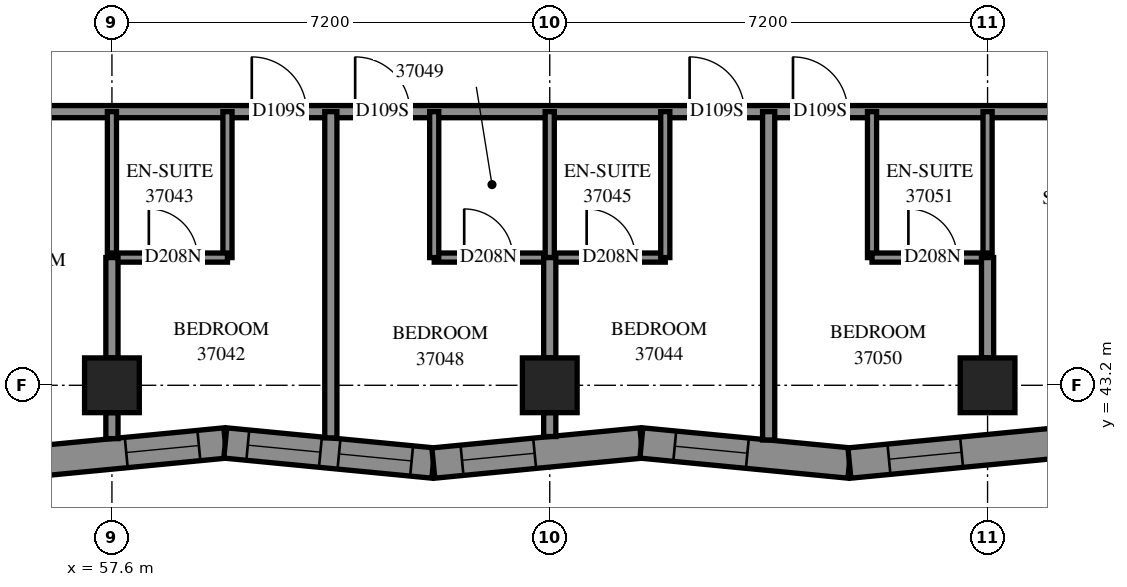
"""IFC4 building model, lengths in metres.
Left out: names, types, materials, properties, quantities, classifications, styles, units other than length and angle.
Written with IfcOpenShell. Run it as: python <this file> out.ifc"""

import sys

from ifc_helpers import new_model, si_unit, direction, frame, frame_2d, origin, origin_2d, place, context, subcontext, project, spatial, polyline, rectangle, outline, extrude, element, fill, save


model = new_model("IFC4")
c1 = context("Model", 3, precision=1e-05, world=origin(), true_north=direction((0.0, 1.0)))
c2 = subcontext(c1, "Body", "Model", "MODEL_VIEW")
j1 = project(units=[si_unit("LENGTHUNIT", "METRE"), si_unit("PLANEANGLEUNIT", "RADIAN")], contexts=[c1])
p1 = place(None, origin())
s1 = spatial("IfcSite", under=j1, at=p1, CompositionType="ELEMENT")
p2 = place(p1, origin())
s2 = spatial("IfcBuilding", under=s1, at=p2, CompositionType="ELEMENT")
p3 = place(p2, frame((0.0, 0.0, 138.8)))
s3 = spatial("IfcBuildingStorey", under=s2, at=p3, CompositionType="ELEMENT", Elevation=138.8)
for number, where, z_axis, x_axis in (
    (1, (57.6, 43.2, 0.0), (0.0, 0.0, 1.0), (1.0, 0.0, 0.0)),
    (2, (64.8, 43.2, 0.0), (0.0, 0.0, 1.0), (1.0, 0.0, 0.0)),
    (3, (72.0, 43.2, 0.0), (0.0, 0.0, 1.0), (1.0, 0.0, 0.0)),
):
    element("IfcColumn", number, at=place(p3, frame(where, z_axis=z_axis, x_axis=x_axis)), inside=s3, PredefinedType="COLUMN", context=c2, shape_type="SweptSolid", body=[
        extrude(rectangle(XDim=0.9, YDim=0.9, at=origin_2d()), origin(), (0.0, 0.0, 1.0), 3.1),
    ])
p4 = place(p3, frame((56.043, 41.921, 0.0), z_axis=(0.0, 0.0, 1.0), x_axis=(0.995380467, 0.096008989, 0.0)))
e4 = element("IfcWall", 4, at=p4, inside=s3, PredefinedType="SOLIDWALL", context=c2, shape_type="SweptSolid", body=[
    extrude(outline(polyline([(-0.024, -0.25), (3.413, -0.25), (3.461, 0.25), (0.024, 0.25), (-0.024, -0.25)])), origin(), (0.0, 0.0, 1.0), 3.1),
])
p5 = place(p4, frame((1.801, 0.0, 0.45)))
e5 = element("IfcOpeningElement", 5, at=p5, cuts=e4, PredefinedType="OPENING", context=c2, shape_type="SweptSolid", body=[
    extrude(rectangle(XDim=1.2, YDim=2.5, at=frame_2d((0.6, 1.25))), frame((0.0, 0.26, 0.0), z_axis=(0.0, -1.0, 0.0), x_axis=(1.0, 0.0, 0.0)), (0.0, 0.0, 1.0), 0.52),
])
p6 = place(p3, frame((59.464, 42.251, 0.0), z_axis=(0.0, 0.0, 1.0), x_axis=(0.995380467, -0.096008989, 0.0)))
e6 = element("IfcWall", 6, at=p6, inside=s3, PredefinedType="SOLIDWALL", context=c2, shape_type="SweptSolid", body=[
    extrude(outline(polyline([(0.024, -0.25), (3.461, -0.25), (3.413, 0.25), (-0.024, 0.25), (0.024, -0.25)])), origin(), (0.0, 0.0, 1.0), 3.1),
])
p7 = place(p6, frame((0.372, 0.0, 0.45)))
e7 = element("IfcOpeningElement", 7, at=p7, cuts=e6, PredefinedType="OPENING", context=c2, shape_type="SweptSolid", body=[
    extrude(rectangle(XDim=1.2, YDim=2.5, at=frame_2d((0.6, 1.25))), frame((0.0, 0.26, 0.0), z_axis=(0.0, -1.0, 0.0), x_axis=(1.0, 0.0, 0.0)), (0.0, 0.0, 1.0), 0.52),
])
p8 = place(p6, frame((1.879, 0.0, 0.45)))
e8 = element("IfcOpeningElement", 8, at=p8, cuts=e6, PredefinedType="OPENING", context=c2, shape_type="SweptSolid", body=[
    extrude(rectangle(XDim=1.2, YDim=2.5, at=frame_2d((0.6, 1.25))), frame((0.0, 0.26, 0.0), z_axis=(0.0, -1.0, 0.0), x_axis=(1.0, 0.0, 0.0)), (0.0, 0.0, 1.0), 0.52),
])
p9 = place(p3, frame((62.885, 41.921, 0.0), z_axis=(0.0, 0.0, 1.0), x_axis=(0.9953807351, 0.0960062087, 0.0)))
e9 = element("IfcWall", 9, at=p9, inside=s3, PredefinedType="SOLIDWALL", context=c2, shape_type="SweptSolid", body=[
    extrude(outline(polyline([(-0.024, -0.25), (3.413, -0.25), (3.461, 0.25), (0.024, 0.25), (-0.024, -0.25)])), origin(), (0.0, 0.0, 1.0), 3.1),
])
p10 = place(p9, frame((0.474, 0.0, 0.45)))
e10 = element("IfcOpeningElement", 10, at=p10, cuts=e9, PredefinedType="OPENING", context=c2, shape_type="SweptSolid", body=[
    extrude(rectangle(XDim=1.2, YDim=2.5, at=frame_2d((0.6, 1.25))), frame((0.0, 0.26, 0.0), z_axis=(0.0, -1.0, 0.0), x_axis=(1.0, 0.0, 0.0)), (0.0, 0.0, 1.0), 0.52),
])
p11 = place(p3, frame((66.307, 42.251, 0.0), z_axis=(0.0, 0.0, 1.0), x_axis=(0.995380467, -0.096008989, 0.0)))
e11 = element("IfcWall", 11, at=p11, inside=s3, PredefinedType="SOLIDWALL", context=c2, shape_type="SweptSolid", body=[
    extrude(outline(polyline([(0.024, -0.25), (3.461, -0.25), (3.413, 0.25), (-0.024, 0.25), (0.024, -0.25)])), origin(), (0.0, 0.0, 1.0), 3.1),
])
p12 = place(p11, frame((0.551, 0.0, 0.45)))
e12 = element("IfcOpeningElement", 12, at=p12, cuts=e11, PredefinedType="OPENING", context=c2, shape_type="SweptSolid", body=[
    extrude(rectangle(XDim=1.2, YDim=2.5, at=frame_2d((0.6, 1.25))), frame((0.0, 0.26, 0.0), z_axis=(0.0, -1.0, 0.0), x_axis=(1.0, 0.0, 0.0)), (0.0, 0.0, 1.0), 0.52),
])
p13 = place(p3, frame((69.728, 41.921, 0.0), z_axis=(0.0, 0.0, 1.0), x_axis=(0.9953825051, 0.0959878563, 0.0)))
e13 = element("IfcWall", 13, at=p13, inside=s3, PredefinedType="SOLIDWALL", context=c2, shape_type="SweptSolid", body=[
    extrude(outline(polyline([(-0.024, -0.25), (3.413, -0.25), (3.505, 0.25), (0.024, 0.25), (-0.024, -0.25)])), origin(), (0.0, 0.0, 1.0), 3.1),
])
p14 = place(p13, frame((0.653, 0.0, 0.45)))
e14 = element("IfcOpeningElement", 14, at=p14, cuts=e13, PredefinedType="OPENING", context=c2, shape_type="SweptSolid", body=[
    extrude(rectangle(XDim=1.2, YDim=2.5, at=frame_2d((0.6, 1.25))), frame((0.0, 0.26, 0.0), z_axis=(0.0, -1.0, 0.0), x_axis=(1.0, 0.0, 0.0)), (0.0, 0.0, 1.0), 0.52),
])
p15 = place(p3, frame((54.9, 47.7, 0.0), z_axis=(0.0, 0.0, 1.0), x_axis=(1.0, 0.0, 0.0)))
e15 = element("IfcWall", 15, at=p15, inside=s3, PredefinedType="PARTITIONING", context=c2, shape_type="SweptSolid", body=[
    extrude(rectangle(XDim=19.326, YDim=0.2, at=frame_2d((9.663, 0.0))), origin(), (0.0, 0.0, 1.0), 3.1),
])
p16 = place(p15, frame((5.0, 0.0, 0.0)))
e16 = element("IfcOpeningElement", 16, at=p16, cuts=e15, PredefinedType="OPENING", context=c2, shape_type="SweptSolid", body=[
    extrude(rectangle(XDim=0.9, YDim=2.1, at=frame_2d((0.45, 1.05))), frame((0.0, 0.11, 0.0), z_axis=(0.0, -1.0, 0.0), x_axis=(1.0, 0.0, 0.0)), (0.0, 0.0, 1.0), 0.22),
])
p17 = place(p15, frame((12.2, 0.0, 0.0)))
e17 = element("IfcOpeningElement", 17, at=p17, cuts=e15, PredefinedType="OPENING", context=c2, shape_type="SweptSolid", body=[
    extrude(rectangle(XDim=0.9, YDim=2.1, at=frame_2d((0.45, 1.05))), frame((0.0, 0.11, 0.0), z_axis=(0.0, -1.0, 0.0), x_axis=(1.0, 0.0, 0.0)), (0.0, 0.0, 1.0), 0.22),
])
p18 = place(p15, frame((6.7, 0.0, 0.0)))
e18 = element("IfcOpeningElement", 18, at=p18, cuts=e15, PredefinedType="OPENING", context=c2, shape_type="SweptSolid", body=[
    extrude(rectangle(XDim=0.9, YDim=2.1, at=frame_2d((0.45, 1.05))), frame((0.0, 0.11, 0.0), z_axis=(0.0, -1.0, 0.0), x_axis=(1.0, 0.0, 0.0)), (0.0, 0.0, 1.0), 0.22),
])
p19 = place(p15, frame((13.9, 0.0, 0.0)))
e19 = element("IfcOpeningElement", 19, at=p19, cuts=e15, PredefinedType="OPENING", context=c2, shape_type="SweptSolid", body=[
    extrude(rectangle(XDim=0.9, YDim=2.1, at=frame_2d((0.45, 1.05))), frame((0.0, 0.11, 0.0), z_axis=(0.0, -1.0, 0.0), x_axis=(1.0, 0.0, 0.0)), (0.0, 0.0, 1.0), 0.22),
])
p20 = place(p3, frame((68.4, 42.3, 0.0), z_axis=(0.0, 0.0, 1.0), x_axis=(0.0, 1.0, 0.0)))
e20 = element("IfcWall", 20, at=p20, inside=s3, PredefinedType="PARTITIONING", context=c2, shape_type="SweptSolid", body=[
    extrude(rectangle(XDim=5.4, YDim=0.2, at=frame_2d((2.7, 0.0))), origin(), (0.0, 0.0, 1.0), 3.1),
])
p21 = place(p3, frame((61.2, 42.335, 0.0), z_axis=(0.0, 0.0, 1.0), x_axis=(0.0, 1.0, 0.0)))
e21 = element("IfcWall", 21, at=p21, inside=s3, PredefinedType="PARTITIONING", context=c2, shape_type="SweptSolid", body=[
    extrude(rectangle(XDim=5.365, YDim=0.2, at=frame_2d((2.683, 0.0))), origin(), (0.0, 0.0, 1.0), 3.1),
])
p22 = place(p3, frame((62.9, 45.3, 0.0), z_axis=(0.0, 0.0, 1.0), x_axis=(1.0, 0.0, 0.0)))
e22 = element("IfcWall", 22, at=p22, inside=s3, PredefinedType="PARTITIONING", context=c2, shape_type="SweptSolid", body=[
    extrude(rectangle(XDim=3.8, YDim=0.15, at=frame_2d((1.9, 0.0))), origin(), (0.0, 0.0, 1.0), 3.1),
])
p23 = place(p22, frame((2.507, 0.0, 0.0)))
e23 = element("IfcOpeningElement", 23, at=p23, cuts=e22, PredefinedType="OPENING", context=c2, shape_type="SweptSolid", body=[
    extrude(rectangle(XDim=0.8, YDim=2.1, at=frame_2d((0.4, 1.05))), frame((0.0, 0.085, 0.0), z_axis=(0.0, -1.0, 0.0), x_axis=(1.0, 0.0, 0.0)), (0.0, 0.0, 1.0), 0.17),
])
p24 = place(p22, frame((0.493, 0.0, 0.0)))
e24 = element("IfcOpeningElement", 24, at=p24, cuts=e22, PredefinedType="OPENING", context=c2, shape_type="SweptSolid", body=[
    extrude(rectangle(XDim=0.8, YDim=2.1, at=frame_2d((0.4, 1.05))), frame((0.0, 0.085, 0.0), z_axis=(0.0, -1.0, 0.0), x_axis=(1.0, 0.0, 0.0)), (0.0, 0.0, 1.0), 0.17),
])
for number, where, z_axis, x_axis in (
    (25, (59.5, 45.3, 0.0), (0.0, 0.0, 1.0), (0.0, 1.0, 0.0)),
    (26, (57.6, 45.3, 0.0), (0.0, 0.0, 1.0), (0.0, 1.0, 0.0)),
    (27, (62.9, 45.3, 0.0), (0.0, 0.0, 1.0), (0.0, 1.0, 0.0)),
    (28, (66.7, 45.3, 0.0), (0.0, 0.0, 1.0), (0.0, 1.0, 0.0)),
    (29, (64.8, 45.3, 0.0), (0.0, 0.0, 1.0), (0.0, 1.0, 0.0)),
    (30, (70.1, 45.3, 0.0), (0.0, 0.0, 1.0), (0.0, 1.0, 0.0)),
    (31, (72.0, 45.3, 0.0), (0.0, 0.0, 1.0), (0.0, 1.0, 0.0)),
):
    element("IfcWall", number, at=place(p3, frame(where, z_axis=z_axis, x_axis=x_axis)), inside=s3, PredefinedType="PARTITIONING", context=c2, shape_type="SweptSolid", body=[
        extrude(rectangle(XDim=2.4, YDim=0.15, at=frame_2d((1.2, 0.0))), origin(), (0.0, 0.0, 1.0), 3.1),
    ])
p25 = place(p3, frame((70.1, 45.3, 0.0), z_axis=(0.0, 0.0, 1.0), x_axis=(1.0, 0.0, 0.0)))
e32 = element("IfcWall", 32, at=p25, inside=s3, PredefinedType="PARTITIONING", context=c2, shape_type="SweptSolid", body=[
    extrude(rectangle(XDim=1.9, YDim=0.15, at=frame_2d((0.95, 0.0))), origin(), (0.0, 0.0, 1.0), 3.1),
])
p26 = place(p25, frame((0.598, 0.0, 0.0)))
e33 = element("IfcOpeningElement", 33, at=p26, cuts=e32, PredefinedType="OPENING", context=c2, shape_type="SweptSolid", body=[
    extrude(rectangle(XDim=0.8, YDim=2.1, at=frame_2d((0.4, 1.05))), frame((0.0, 0.085, 0.0), z_axis=(0.0, -1.0, 0.0), x_axis=(1.0, 0.0, 0.0)), (0.0, 0.0, 1.0), 0.17),
])
p27 = place(p3, frame((57.6, 45.3, 0.0), z_axis=(0.0, 0.0, 1.0), x_axis=(1.0, 0.0, 0.0)))
e34 = element("IfcWall", 34, at=p27, inside=s3, PredefinedType="PARTITIONING", context=c2, shape_type="SweptSolid", body=[
    extrude(rectangle(XDim=1.9, YDim=0.15, at=frame_2d((0.95, 0.0))), origin(), (0.0, 0.0, 1.0), 3.1),
])
p28 = place(p27, frame((0.607, 0.0, 0.0)))
e35 = element("IfcOpeningElement", 35, at=p28, cuts=e34, PredefinedType="OPENING", context=c2, shape_type="SweptSolid", body=[
    extrude(rectangle(XDim=0.8, YDim=2.1, at=frame_2d((0.4, 1.05))), frame((0.0, 0.085, 0.0), z_axis=(0.0, -1.0, 0.0), x_axis=(1.0, 0.0, 0.0)), (0.0, 0.0, 1.0), 0.17),
])
for number, where, z_axis, x_axis in (
    (36, (57.6, 43.65, 0.0), (0.0, 0.0, 1.0), (0.0, 1.0, 0.0)),
    (37, (64.8, 43.65, 0.0), (0.0, 0.0, 1.0), (0.0, 1.0, 0.0)),
    (38, (72.0, 43.65, 0.0), (0.0, 0.0, 1.0), (0.0, 1.0, 0.0)),
):
    element("IfcWall", number, at=place(p3, frame(where, z_axis=z_axis, x_axis=x_axis)), inside=s3, PredefinedType="PARTITIONING", context=c2, shape_type="SweptSolid", body=[
        extrude(rectangle(XDim=1.65, YDim=0.2, at=frame_2d((0.825, 0.0))), origin(), (0.0, 0.0, 1.0), 3.1),
    ])
p29 = place(p3, frame((57.6, 42.322, 0.0), z_axis=(0.0, 0.0, 1.0), x_axis=(0.0, 1.0, 0.0)))
e39 = element("IfcWall", 39, at=p29, inside=s3, PredefinedType="PARTITIONING", context=c2, shape_type="SweptSolid", body=[
    extrude(rectangle(XDim=0.427, YDim=0.2, at=frame_2d((0.214, 0.0))), origin(), (0.0, 0.0, 1.0), 3.1),
])
p30 = place(p3, frame((64.8, 42.357, 0.0), z_axis=(0.0, 0.0, 1.0), x_axis=(0.0, 1.0, 0.0)))
e40 = element("IfcWall", 40, at=p30, inside=s3, PredefinedType="PARTITIONING", context=c2, shape_type="SweptSolid", body=[
    extrude(rectangle(XDim=0.393, YDim=0.2, at=frame_2d((0.197, 0.0))), origin(), (0.0, 0.0, 1.0), 3.1),
])
p31 = place(p5, origin())
e41 = element("IfcWindow", 41, at=p31, inside=s3, PartitioningType="SINGLE_PANEL", PredefinedType="WINDOW", context=c2, shape_type="SweptSolid", body=[
    extrude(rectangle(XDim=1.2, YDim=2.5, at=frame_2d((0.6, 1.25))), frame((0.0, 0.18, 0.0), z_axis=(0.0, -1.0, 0.0), x_axis=(1.0, 0.0, 0.0)), (0.0, 0.0, 1.0), 0.06),
])
fill(e5, e41)
p32 = place(p7, origin())
e42 = element("IfcWindow", 42, at=p32, inside=s3, PartitioningType="SINGLE_PANEL", PredefinedType="WINDOW", context=c2, shape_type="SweptSolid", body=[
    extrude(rectangle(XDim=1.2, YDim=2.5, at=frame_2d((0.6, 1.25))), frame((0.0, 0.18, 0.0), z_axis=(0.0, -1.0, 0.0), x_axis=(1.0, 0.0, 0.0)), (0.0, 0.0, 1.0), 0.06),
])
fill(e7, e42)
p33 = place(p8, origin())
e43 = element("IfcWindow", 43, at=p33, inside=s3, PartitioningType="SINGLE_PANEL", PredefinedType="WINDOW", context=c2, shape_type="SweptSolid", body=[
    extrude(rectangle(XDim=1.2, YDim=2.5, at=frame_2d((0.6, 1.25))), frame((0.0, 0.18, 0.0), z_axis=(0.0, -1.0, 0.0), x_axis=(1.0, 0.0, 0.0)), (0.0, 0.0, 1.0), 0.06),
])
fill(e8, e43)
p34 = place(p10, origin())
e44 = element("IfcWindow", 44, at=p34, inside=s3, PartitioningType="SINGLE_PANEL", PredefinedType="WINDOW", context=c2, shape_type="SweptSolid", body=[
    extrude(rectangle(XDim=1.2, YDim=2.5, at=frame_2d((0.6, 1.25))), frame((0.0, 0.18, 0.0), z_axis=(0.0, -1.0, 0.0), x_axis=(1.0, 0.0, 0.0)), (0.0, 0.0, 1.0), 0.06),
])
fill(e10, e44)
p35 = place(p12, origin())
e45 = element("IfcWindow", 45, at=p35, inside=s3, PartitioningType="SINGLE_PANEL", PredefinedType="WINDOW", context=c2, shape_type="SweptSolid", body=[
    extrude(rectangle(XDim=1.2, YDim=2.5, at=frame_2d((0.6, 1.25))), frame((0.0, 0.18, 0.0), z_axis=(0.0, -1.0, 0.0), x_axis=(1.0, 0.0, 0.0)), (0.0, 0.0, 1.0), 0.06),
])
fill(e12, e45)
p36 = place(p14, origin())
e46 = element("IfcWindow", 46, at=p36, inside=s3, PartitioningType="SINGLE_PANEL", PredefinedType="WINDOW", context=c2, shape_type="SweptSolid", body=[
    extrude(rectangle(XDim=1.2, YDim=2.5, at=frame_2d((0.6, 1.25))), frame((0.0, 0.18, 0.0), z_axis=(0.0, -1.0, 0.0), x_axis=(1.0, 0.0, 0.0)), (0.0, 0.0, 1.0), 0.06),
])
fill(e14, e46)
p37 = place(p16, origin())
e47 = element("IfcDoor", 47, at=p37, inside=s3, OperationType="SINGLE_SWING_LEFT", PredefinedType="DOOR", context=c2, shape_type="SweptSolid", body=[
    extrude(rectangle(XDim=0.9, YDim=2.1, at=frame_2d((0.45, 1.05))), frame((0.0, 0.025, 0.0), z_axis=(0.0, -1.0, 0.0), x_axis=(1.0, 0.0, 0.0)), (0.0, 0.0, 1.0), 0.05),
])
fill(e16, e47)
p38 = place(p28, origin())
e48 = element("IfcDoor", 48, at=p38, inside=s3, OperationType="SINGLE_SWING_RIGHT", PredefinedType="DOOR", context=c2, shape_type="SweptSolid", body=[
    extrude(rectangle(XDim=0.8, YDim=2.1, at=frame_2d((0.4, 1.05))), frame((0.0, 0.025, 0.0), z_axis=(0.0, -1.0, 0.0), x_axis=(1.0, 0.0, 0.0)), (0.0, 0.0, 1.0), 0.05),
])
fill(e35, e48)
p39 = place(p17, origin())
e49 = element("IfcDoor", 49, at=p39, inside=s3, OperationType="SINGLE_SWING_LEFT", PredefinedType="DOOR", context=c2, shape_type="SweptSolid", body=[
    extrude(rectangle(XDim=0.9, YDim=2.1, at=frame_2d((0.45, 1.05))), frame((0.0, 0.025, 0.0), z_axis=(0.0, -1.0, 0.0), x_axis=(1.0, 0.0, 0.0)), (0.0, 0.0, 1.0), 0.05),
])
fill(e17, e49)
p40 = place(p23, origin())
e50 = element("IfcDoor", 50, at=p40, inside=s3, OperationType="SINGLE_SWING_RIGHT", PredefinedType="DOOR", context=c2, shape_type="SweptSolid", body=[
    extrude(rectangle(XDim=0.8, YDim=2.1, at=frame_2d((0.4, 1.05))), frame((0.0, 0.025, 0.0), z_axis=(0.0, -1.0, 0.0), x_axis=(1.0, 0.0, 0.0)), (0.0, 0.0, 1.0), 0.05),
])
fill(e23, e50)
p41 = place(p18, origin())
e51 = element("IfcDoor", 51, at=p41, inside=s3, OperationType="SINGLE_SWING_RIGHT", PredefinedType="DOOR", context=c2, shape_type="SweptSolid", body=[
    extrude(rectangle(XDim=0.9, YDim=2.1, at=frame_2d((0.45, 1.05))), frame((0.0, 0.025, 0.0), z_axis=(0.0, -1.0, 0.0), x_axis=(1.0, 0.0, 0.0)), (0.0, 0.0, 1.0), 0.05),
])
fill(e18, e51)
p42 = place(p24, origin())
e52 = element("IfcDoor", 52, at=p42, inside=s3, OperationType="SINGLE_SWING_RIGHT", PredefinedType="DOOR", context=c2, shape_type="SweptSolid", body=[
    extrude(rectangle(XDim=0.8, YDim=2.1, at=frame_2d((0.4, 1.05))), frame((0.0, 0.025, 0.0), z_axis=(0.0, -1.0, 0.0), x_axis=(1.0, 0.0, 0.0)), (0.0, 0.0, 1.0), 0.05),
])
fill(e24, e52)
p43 = place(p19, origin())
e53 = element("IfcDoor", 53, at=p43, inside=s3, OperationType="SINGLE_SWING_RIGHT", PredefinedType="DOOR", context=c2, shape_type="SweptSolid", body=[
    extrude(rectangle(XDim=0.9, YDim=2.1, at=frame_2d((0.45, 1.05))), frame((0.0, 0.025, 0.0), z_axis=(0.0, -1.0, 0.0), x_axis=(1.0, 0.0, 0.0)), (0.0, 0.0, 1.0), 0.05),
])
fill(e19, e53)
p44 = place(p26, origin())
e54 = element("IfcDoor", 54, at=p44, inside=s3, OperationType="SINGLE_SWING_RIGHT", PredefinedType="DOOR", context=c2, shape_type="SweptSolid", body=[
    extrude(rectangle(XDim=0.8, YDim=2.1, at=frame_2d((0.4, 1.05))), frame((0.0, 0.025, 0.0), z_axis=(0.0, -1.0, 0.0), x_axis=(1.0, 0.0, 0.0)), (0.0, 0.0, 1.0), 0.05),
])
fill(e33, e54)
save(model, sys.argv[1])
